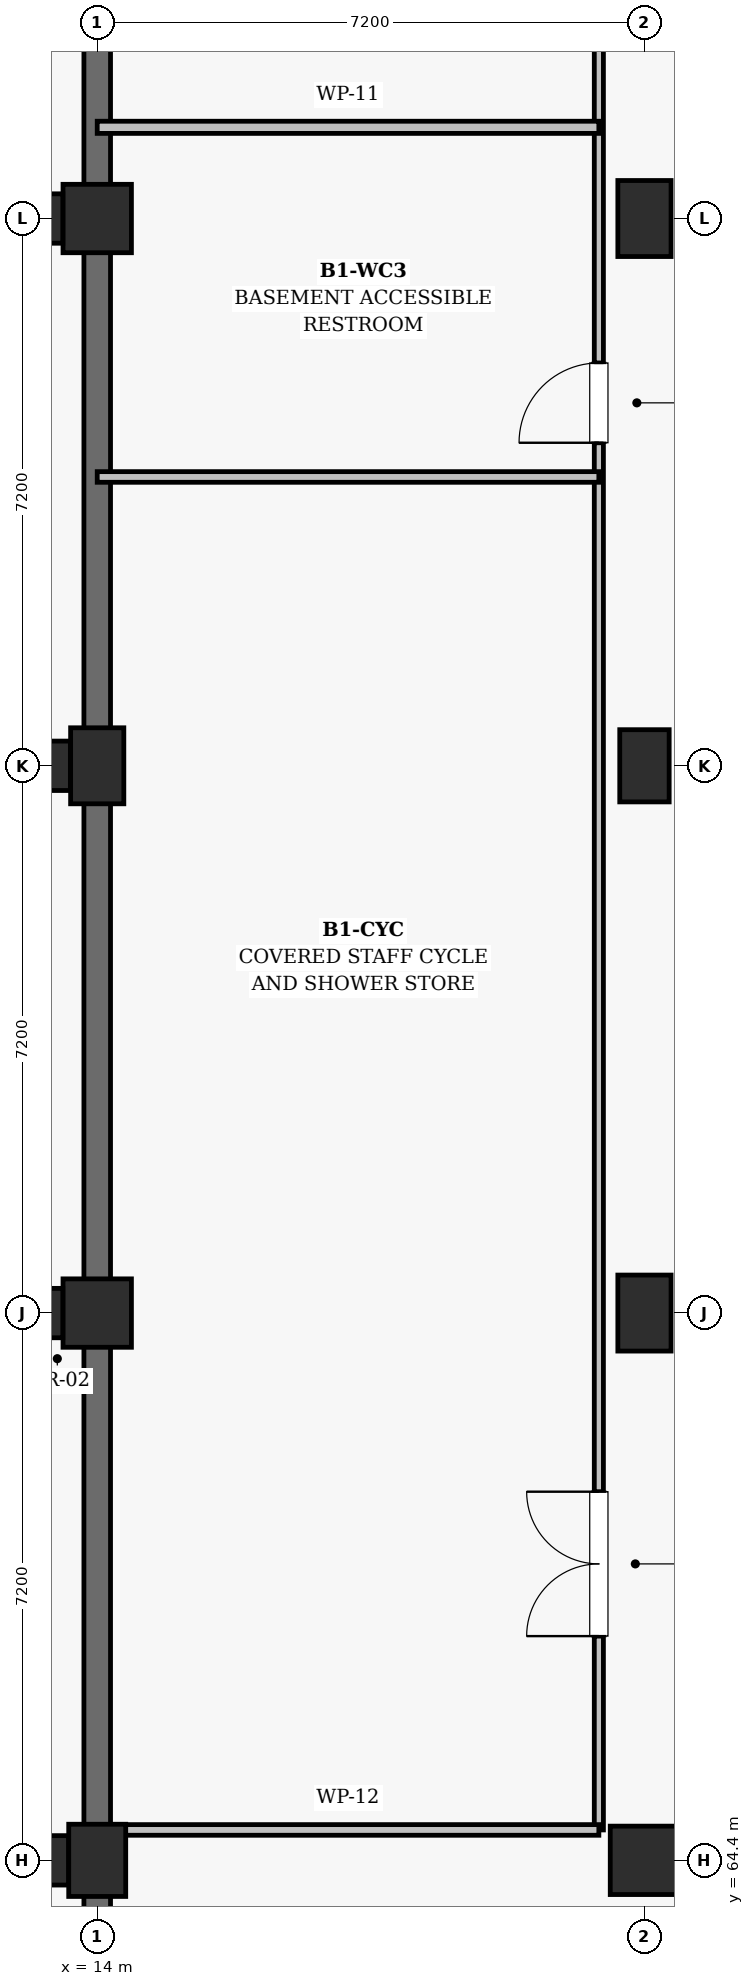
"""IFC4 building model, lengths in metres.
Left out: names, types, materials, properties, quantities, classifications, styles, units other than length and angle.
Written with IfcOpenShell. Run it as: python <this file> out.ifc"""

import sys

from ifc_helpers import new_model, si_unit, direction, frame, frame_2d, origin, origin_2d, place, context, subcontext, project, spatial, rectangle, extrude, element, fill, save


model = new_model("IFC4")
c1 = context("Model", 3, precision=1e-05, world=origin(), true_north=direction((0.0, 1.0)))
c2 = subcontext(c1, "Body", "Model", "MODEL_VIEW")
j1 = project(units=[si_unit("LENGTHUNIT", "METRE"), si_unit("PLANEANGLEUNIT", "RADIAN")], contexts=[c1])
p1 = place(None, origin())
s1 = spatial("IfcSite", under=j1, at=p1, CompositionType="ELEMENT")
p2 = place(p1, origin())
s2 = spatial("IfcBuilding", under=s1, at=p2, CompositionType="ELEMENT")
p3 = place(p2, frame((0.0, 0.0, -4.5)))
s3 = spatial("IfcBuildingStorey", under=s2, at=p3, CompositionType="ELEMENT", Elevation=-4.5)
p4 = place(p3, frame((14.0, 64.4, 0.0), z_axis=(0.0, 0.0, 1.0), x_axis=(1.0, 0.0, 0.0)))
e1 = element("IfcColumn", 1, at=p4, inside=s3, PredefinedType="COLUMN", context=c2, shape_type="SweptSolid", body=[
    extrude(rectangle(XDim=0.75, YDim=0.95, at=origin_2d()), origin(), (0.0, 0.0, 1.0), 4.5),
])
p5 = place(p3, frame((14.0, 71.6, 0.0), z_axis=(0.0, 0.0, 1.0), x_axis=(1.0, 0.0, 0.0)))
e2 = element("IfcColumn", 2, at=p5, inside=s3, PredefinedType="COLUMN", context=c2, shape_type="SweptSolid", body=[
    extrude(rectangle(XDim=0.9, YDim=0.9, at=origin_2d()), origin(), (0.0, 0.0, 1.0), 4.5),
])
p6 = place(p3, frame((14.0, 78.8, 0.0), z_axis=(0.0, 0.0, 1.0), x_axis=(1.0, 0.0, 0.0)))
e3 = element("IfcColumn", 3, at=p6, inside=s3, PredefinedType="COLUMN", context=c2, shape_type="SweptSolid", body=[
    extrude(rectangle(XDim=0.7, YDim=1.0, at=origin_2d()), origin(), (0.0, 0.0, 1.0), 4.5),
])
for number, where, z_axis, x_axis in (
    (4, (14.0, 86.0, 0.0), (0.0, 0.0, 1.0), (1.0, 0.0, 0.0)),
    (5, (21.2, 64.4, 0.0), (0.0, 0.0, 1.0), (1.0, 0.0, 0.0)),
):
    element("IfcColumn", number, at=place(p3, frame(where, z_axis=z_axis, x_axis=x_axis)), inside=s3, PredefinedType="COLUMN", context=c2, shape_type="SweptSolid", body=[
        extrude(rectangle(XDim=0.9, YDim=0.9, at=origin_2d()), origin(), (0.0, 0.0, 1.0), 4.5),
    ])
p7 = place(p3, frame((21.2, 71.6, 0.0), z_axis=(0.0, 0.0, 1.0), x_axis=(1.0, 0.0, 0.0)))
e6 = element("IfcColumn", 6, at=p7, inside=s3, PredefinedType="COLUMN", context=c2, shape_type="SweptSolid", body=[
    extrude(rectangle(XDim=0.7, YDim=1.0, at=origin_2d()), origin(), (0.0, 0.0, 1.0), 4.5),
])
p8 = place(p3, frame((21.2, 78.8, 0.0), z_axis=(0.0, 0.0, 1.0), x_axis=(1.0, 0.0, 0.0)))
e7 = element("IfcColumn", 7, at=p8, inside=s3, PredefinedType="COLUMN", context=c2, shape_type="SweptSolid", body=[
    extrude(rectangle(XDim=0.65, YDim=0.95, at=origin_2d()), origin(), (0.0, 0.0, 1.0), 4.5),
])
p9 = place(p3, frame((21.2, 86.0, 0.0), z_axis=(0.0, 0.0, 1.0), x_axis=(1.0, 0.0, 0.0)))
e8 = element("IfcColumn", 8, at=p9, inside=s3, PredefinedType="COLUMN", context=c2, shape_type="SweptSolid", body=[
    extrude(rectangle(XDim=0.7, YDim=1.0, at=origin_2d()), origin(), (0.0, 0.0, 1.0), 4.5),
])
for number, where, z_axis, x_axis in (
    (9, (13.147, 64.4, 0.0), (0.0, 0.0, 1.0), (0.0, 1.0, 0.0)),
    (10, (13.072, 71.6, 0.0), (0.0, 0.0, 1.0), (0.0, 1.0, 0.0)),
    (11, (13.172, 78.8, 0.0), (0.0, 0.0, 1.0), (0.0, 1.0, 0.0)),
    (12, (13.072, 86.0, 0.0), (0.0, 0.0, 1.0), (0.0, 1.0, 0.0)),
):
    element("IfcColumn", number, at=place(p3, frame(where, z_axis=z_axis, x_axis=x_axis)), inside=s3, PredefinedType="COLUMN", context=c2, shape_type="SweptSolid", body=[
        extrude(rectangle(XDim=0.65, YDim=0.95, at=origin_2d()), origin(), (0.0, 0.0, 1.0), 4.5),
    ])
p10 = place(p3, frame((14.0, 14.0, 0.0), z_axis=(0.0, 0.0, 1.0), x_axis=(0.0, 1.0, 0.0)))
e13 = element("IfcWall", 13, at=p10, inside=s3, PredefinedType="USERDEFINED", context=c2, shape_type="SweptSolid", body=[
    extrude(rectangle(XDim=114.0, YDim=0.35, at=frame_2d((57.0, 0.0))), origin(), (0.0, 0.0, 1.0), 4.16),
])
p11 = place(p3, frame((20.6, 64.8, 0.0), z_axis=(0.0, 0.0, 1.0), x_axis=(0.0, 1.0, 0.0)))
e14 = element("IfcWall", 14, at=p11, inside=s3, PredefinedType="PARTITIONING", context=c2, shape_type="SweptSolid", body=[
    extrude(rectangle(XDim=37.6, YDim=0.12, at=frame_2d((18.8, 0.0))), origin(), (0.0, 0.0, 1.0), 3.36),
])
p12 = place(p11, frame((33.0, 0.0, 0.0)))
e15 = element("IfcOpeningElement", 15, at=p12, cuts=e14, PredefinedType="OPENING", context=c2, shape_type="SweptSolid", body=[
    extrude(rectangle(XDim=0.95, YDim=2.15, at=frame_2d((0.475, 1.075))), frame((0.0, 0.07, 0.0), z_axis=(0.0, -1.0, 0.0), x_axis=(1.0, 0.0, 0.0)), (0.0, 0.0, 1.0), 0.14),
])
p13 = place(p11, frame((25.4, 0.0, 0.0)))
e16 = element("IfcOpeningElement", 16, at=p13, cuts=e14, PredefinedType="OPENING", context=c2, shape_type="SweptSolid", body=[
    extrude(rectangle(XDim=0.95, YDim=2.15, at=frame_2d((0.475, 1.075))), frame((0.0, 0.07, 0.0), z_axis=(0.0, -1.0, 0.0), x_axis=(1.0, 0.0, 0.0)), (0.0, 0.0, 1.0), 0.14),
])
p14 = place(p11, frame((18.25, 0.0, 0.0)))
e17 = element("IfcOpeningElement", 17, at=p14, cuts=e14, PredefinedType="OPENING", context=c2, shape_type="SweptSolid", body=[
    extrude(rectangle(XDim=1.05, YDim=2.15, at=frame_2d((0.525, 1.075))), frame((0.0, 0.07, 0.0), z_axis=(0.0, -1.0, 0.0), x_axis=(1.0, 0.0, 0.0)), (0.0, 0.0, 1.0), 0.14),
])
p15 = place(p11, frame((2.55, 0.0, 0.0)))
e18 = element("IfcOpeningElement", 18, at=p15, cuts=e14, PredefinedType="OPENING", context=c2, shape_type="SweptSolid", body=[
    extrude(rectangle(XDim=1.9, YDim=2.3, at=frame_2d((0.95, 1.15))), frame((0.0, 0.07, 0.0), z_axis=(0.0, -1.0, 0.0), x_axis=(1.0, 0.0, 0.0)), (0.0, 0.0, 1.0), 0.14),
])
p16 = place(p3, frame((14.0, 64.8, 0.0), z_axis=(0.0, 0.0, 1.0), x_axis=(1.0, 0.0, 0.0)))
e19 = element("IfcWall", 19, at=p16, inside=s3, PredefinedType="PARTITIONING", context=c2, shape_type="SweptSolid", body=[
    extrude(rectangle(XDim=6.6, YDim=0.14, at=frame_2d((3.3, 0.0))), origin(), (0.0, 0.0, 1.0), 3.56),
])
p17 = place(p3, frame((14.0, 87.2, 0.0), z_axis=(0.0, 0.0, 1.0), x_axis=(1.0, 0.0, 0.0)))
e20 = element("IfcWall", 20, at=p17, inside=s3, PredefinedType="PARTITIONING", context=c2, shape_type="SweptSolid", body=[
    extrude(rectangle(XDim=6.6, YDim=0.16, at=frame_2d((3.3, 0.0))), origin(), (0.0, 0.0, 1.0), 3.56),
])
p18 = place(p3, frame((14.0, 82.6, 0.0), z_axis=(0.0, 0.0, 1.0), x_axis=(1.0, 0.0, 0.0)))
e21 = element("IfcWall", 21, at=p18, inside=s3, PredefinedType="PARTITIONING", context=c2, shape_type="SweptSolid", body=[
    extrude(rectangle(XDim=6.6, YDim=0.14, at=frame_2d((3.3, 0.0))), origin(), (0.0, 0.0, 1.0), 3.56),
])
p19 = place(p14, origin())
e22 = element("IfcDoor", 22, at=p19, inside=s3, OperationType="SINGLE_SWING_LEFT", PredefinedType="DOOR", context=c2, shape_type="SweptSolid", body=[
    extrude(rectangle(XDim=1.05, YDim=2.15, at=frame_2d((0.525, 1.075))), frame((0.0, 0.025, 0.0), z_axis=(0.0, -1.0, 0.0), x_axis=(1.0, 0.0, 0.0)), (0.0, 0.0, 1.0), 0.05),
])
fill(e17, e22)
p20 = place(p15, origin())
e23 = element("IfcDoor", 23, at=p20, inside=s3, OperationType="DOUBLE_DOOR_SINGLE_SWING", PredefinedType="DOOR", context=c2, shape_type="SweptSolid", body=[
    extrude(rectangle(XDim=1.9, YDim=2.3, at=frame_2d((0.95, 1.15))), frame((0.0, 0.025, 0.0), z_axis=(0.0, -1.0, 0.0), x_axis=(1.0, 0.0, 0.0)), (0.0, 0.0, 1.0), 0.05),
])
fill(e18, e23)
save(model, sys.argv[1])
